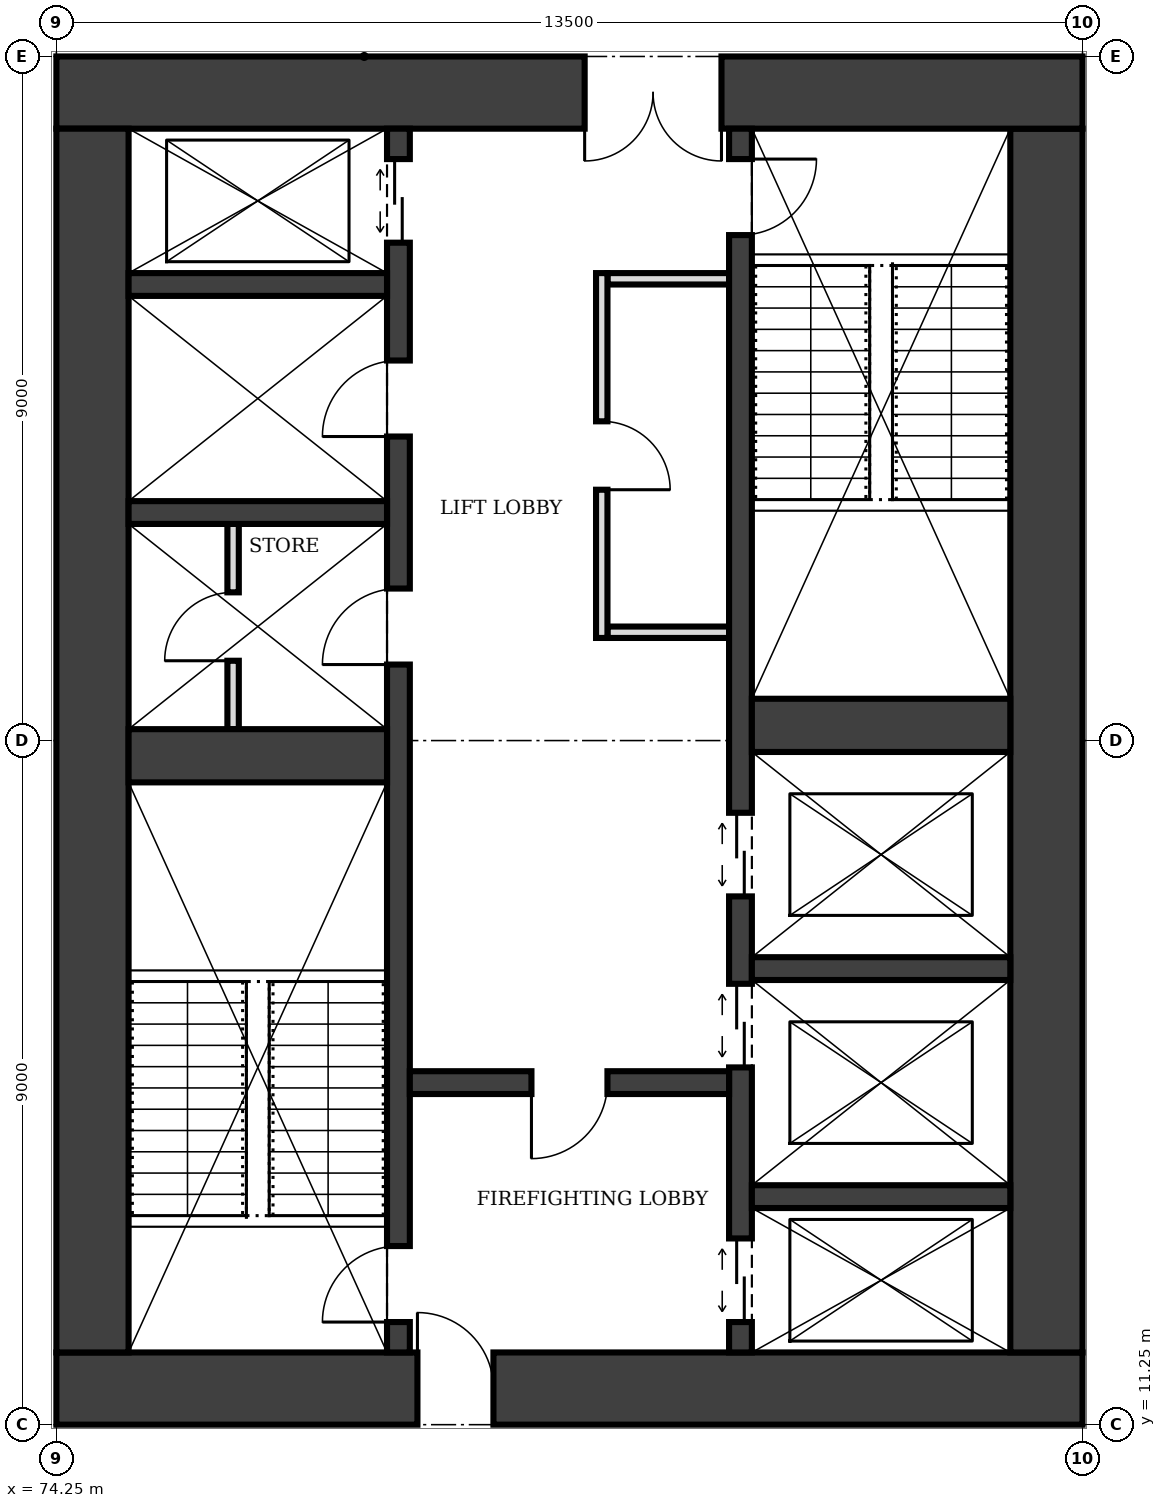
"""IFC4 building model, lengths in metres.
Left out: names, types, materials, properties, quantities, classifications, styles, units other than length and angle.
Written with IfcOpenShell. Run it as: python <this file> out.ifc"""

import sys

from ifc_helpers import new_model, si_unit, direction, frame, frame_2d, origin, place, context, subcontext, project, spatial, rectangle, extrude, element, fill, save


model = new_model("IFC4")
c1 = context("Model", 3, precision=1e-05, world=origin(), true_north=direction((0.0, 1.0)))
c2 = subcontext(c1, "Body", "Model", "MODEL_VIEW")
j1 = project(units=[si_unit("LENGTHUNIT", "METRE"), si_unit("PLANEANGLEUNIT", "RADIAN")], contexts=[c1])
p1 = place(None, origin())
s1 = spatial("IfcSite", under=j1, at=p1, CompositionType="ELEMENT")
p2 = place(p1, origin())
s2 = spatial("IfcBuilding", under=s1, at=p2, CompositionType="ELEMENT")
p3 = place(p2, frame((0.0, 0.0, 113.0)))
s3 = spatial("IfcBuildingStorey", under=s2, at=p3, CompositionType="ELEMENT", Elevation=113.0)
p4 = place(p3, frame((74.25, 11.725, 0.0), z_axis=(0.0, 0.0, 1.0), x_axis=(1.0, 0.0, 0.0)))
e1 = element("IfcWall", 1, at=p4, inside=s3, PredefinedType="SHEAR", context=c2, shape_type="SweptSolid", body=[
    extrude(rectangle(XDim=13.5, YDim=0.95, at=frame_2d((6.75, 0.0))), origin(), (0.0, 0.0, 1.0), 4.0),
])
p5 = place(p4, frame((4.75, 0.0, 0.0)))
e2 = element("IfcOpeningElement", 2, at=p5, cuts=e1, PredefinedType="OPENING", context=c2, shape_type="SweptSolid", body=[
    extrude(rectangle(XDim=1.0, YDim=2.1, at=frame_2d((0.5, 1.05))), frame((0.0, 0.485, 0.0), z_axis=(0.0, -1.0, 0.0), x_axis=(1.0, 0.0, 0.0)), (0.0, 0.0, 1.0), 0.97),
])
p6 = place(p3, frame((87.275, 12.2, 0.0), z_axis=(0.0, 0.0, 1.0), x_axis=(0.0, 1.0, 0.0)))
e3 = element("IfcWall", 3, at=p6, inside=s3, PredefinedType="SHEAR", context=c2, shape_type="SweptSolid", body=[
    extrude(rectangle(XDim=16.1, YDim=0.95, at=frame_2d((8.05, 0.0))), origin(), (0.0, 0.0, 1.0), 4.0),
])
p7 = place(p3, frame((87.75, 28.775, 0.0), z_axis=(0.0, 0.0, 1.0), x_axis=(-1.0, 0.0, 0.0)))
e4 = element("IfcWall", 4, at=p7, inside=s3, PredefinedType="SHEAR", context=c2, shape_type="SweptSolid", body=[
    extrude(rectangle(XDim=13.5, YDim=0.95, at=frame_2d((6.75, 0.0))), origin(), (0.0, 0.0, 1.0), 4.0),
])
p8 = place(p7, frame((4.75, 0.0, 0.0)))
e5 = element("IfcOpeningElement", 5, at=p8, cuts=e4, PredefinedType="OPENING", context=c2, shape_type="SweptSolid", body=[
    extrude(rectangle(XDim=1.8, YDim=2.1, at=frame_2d((0.9, 1.05))), frame((0.0, 0.485, 0.0), z_axis=(0.0, -1.0, 0.0), x_axis=(1.0, 0.0, 0.0)), (0.0, 0.0, 1.0), 0.97),
])
p9 = place(p3, frame((74.725, 28.3, 0.0), z_axis=(0.0, 0.0, 1.0), x_axis=(0.0, -1.0, 0.0)))
e6 = element("IfcWall", 6, at=p9, inside=s3, PredefinedType="SHEAR", context=c2, shape_type="SweptSolid", body=[
    extrude(rectangle(XDim=16.1, YDim=0.95, at=frame_2d((8.05, 0.0))), origin(), (0.0, 0.0, 1.0), 4.0),
])
p10 = place(p3, frame((78.75, 12.2, 0.0), z_axis=(0.0, 0.0, 1.0), x_axis=(0.0, 1.0, 0.0)))
e7 = element("IfcWall", 7, at=p10, inside=s3, PredefinedType="SHEAR", context=c2, shape_type="SweptSolid", body=[
    extrude(rectangle(XDim=16.1, YDim=0.3, at=frame_2d((8.05, 0.0))), origin(), (0.0, 0.0, 1.0), 4.0),
])
p11 = place(p10, frame((0.4, 0.0, 0.0)))
e8 = element("IfcOpeningElement", 8, at=p11, cuts=e7, PredefinedType="OPENING", context=c2, shape_type="SweptSolid", body=[
    extrude(rectangle(XDim=1.0, YDim=2.1, at=frame_2d((0.5, 1.05))), frame((0.0, 0.16, 0.0), z_axis=(0.0, -1.0, 0.0), x_axis=(1.0, 0.0, 0.0)), (0.0, 0.0, 1.0), 0.32),
])
p12 = place(p10, frame((14.6, 0.0, 0.0)))
e9 = element("IfcOpeningElement", 9, at=p12, cuts=e7, PredefinedType="OPENING", context=c2, shape_type="SweptSolid", body=[
    extrude(rectangle(XDim=1.1, YDim=2.1, at=frame_2d((0.55, 1.05))), frame((0.0, 0.16, 0.0), z_axis=(0.0, -1.0, 0.0), x_axis=(1.0, 0.0, 0.0)), (0.0, 0.0, 1.0), 0.32),
])
p13 = place(p10, frame((9.05, 0.0, 0.0)))
e10 = element("IfcOpeningElement", 10, at=p13, cuts=e7, PredefinedType="OPENING", context=c2, shape_type="SweptSolid", body=[
    extrude(rectangle(XDim=1.0, YDim=2.1, at=frame_2d((0.5, 1.05))), frame((0.0, 0.16, 0.0), z_axis=(0.0, -1.0, 0.0), x_axis=(1.0, 0.0, 0.0)), (0.0, 0.0, 1.0), 0.32),
])
p14 = place(p10, frame((12.05, 0.0, 0.0)))
e11 = element("IfcOpeningElement", 11, at=p14, cuts=e7, PredefinedType="OPENING", context=c2, shape_type="SweptSolid", body=[
    extrude(rectangle(XDim=1.0, YDim=2.1, at=frame_2d((0.5, 1.05))), frame((0.0, 0.16, 0.0), z_axis=(0.0, -1.0, 0.0), x_axis=(1.0, 0.0, 0.0)), (0.0, 0.0, 1.0), 0.32),
])
p15 = place(p3, frame((83.25, 12.2, 0.0), z_axis=(0.0, 0.0, 1.0), x_axis=(0.0, 1.0, 0.0)))
e12 = element("IfcWall", 12, at=p15, inside=s3, PredefinedType="SHEAR", context=c2, shape_type="SweptSolid", body=[
    extrude(rectangle(XDim=16.1, YDim=0.3, at=frame_2d((8.05, 0.0))), origin(), (0.0, 0.0, 1.0), 4.0),
])
p16 = place(p15, frame((14.7, 0.0, 0.0)))
e13 = element("IfcOpeningElement", 13, at=p16, cuts=e12, PredefinedType="OPENING", context=c2, shape_type="SweptSolid", body=[
    extrude(rectangle(XDim=1.0, YDim=2.1, at=frame_2d((0.5, 1.05))), frame((0.0, 0.16, 0.0), z_axis=(0.0, -1.0, 0.0), x_axis=(1.0, 0.0, 0.0)), (0.0, 0.0, 1.0), 0.32),
])
p17 = place(p15, frame((0.4, 0.0, 0.0)))
e14 = element("IfcOpeningElement", 14, at=p17, cuts=e12, PredefinedType="OPENING", context=c2, shape_type="SweptSolid", body=[
    extrude(rectangle(XDim=1.1, YDim=2.1, at=frame_2d((0.55, 1.05))), frame((0.0, 0.16, 0.0), z_axis=(0.0, -1.0, 0.0), x_axis=(1.0, 0.0, 0.0)), (0.0, 0.0, 1.0), 0.32),
])
p18 = place(p15, frame((3.75, 0.0, 0.0)))
e15 = element("IfcOpeningElement", 15, at=p18, cuts=e12, PredefinedType="OPENING", context=c2, shape_type="SweptSolid", body=[
    extrude(rectangle(XDim=1.1, YDim=2.1, at=frame_2d((0.55, 1.05))), frame((0.0, 0.16, 0.0), z_axis=(0.0, -1.0, 0.0), x_axis=(1.0, 0.0, 0.0)), (0.0, 0.0, 1.0), 0.32),
])
p19 = place(p15, frame((6.0, 0.0, 0.0)))
e16 = element("IfcOpeningElement", 16, at=p19, cuts=e12, PredefinedType="OPENING", context=c2, shape_type="SweptSolid", body=[
    extrude(rectangle(XDim=1.1, YDim=2.1, at=frame_2d((0.55, 1.05))), frame((0.0, 0.16, 0.0), z_axis=(0.0, -1.0, 0.0), x_axis=(1.0, 0.0, 0.0)), (0.0, 0.0, 1.0), 0.32),
])
p20 = place(p3, frame((75.2, 20.05, 0.0), z_axis=(0.0, 0.0, 1.0), x_axis=(1.0, 0.0, 0.0)))
e17 = element("IfcWall", 17, at=p20, inside=s3, PredefinedType="SHEAR", context=c2, shape_type="SweptSolid", body=[
    extrude(rectangle(XDim=3.4, YDim=0.7, at=frame_2d((1.7, 0.0))), origin(), (0.0, 0.0, 1.0), 4.0),
])
p21 = place(p3, frame((78.9, 15.75, 0.0), z_axis=(0.0, 0.0, 1.0), x_axis=(1.0, 0.0, 0.0)))
e18 = element("IfcWall", 18, at=p21, inside=s3, PredefinedType="SHEAR", context=c2, shape_type="SweptSolid", body=[
    extrude(rectangle(XDim=4.2, YDim=0.3, at=frame_2d((2.1, 0.0))), origin(), (0.0, 0.0, 1.0), 4.0),
])
p22 = place(p21, frame((1.6, 0.0, 0.0)))
e19 = element("IfcOpeningElement", 19, at=p22, cuts=e18, PredefinedType="OPENING", context=c2, shape_type="SweptSolid", body=[
    extrude(rectangle(XDim=1.0, YDim=2.1, at=frame_2d((0.5, 1.05))), frame((0.0, 0.16, 0.0), z_axis=(0.0, -1.0, 0.0), x_axis=(1.0, 0.0, 0.0)), (0.0, 0.0, 1.0), 0.32),
])
for number, where, z_axis, x_axis in (
    (20, (83.4, 14.25, 0.0), (0.0, 0.0, 1.0), (1.0, 0.0, 0.0)),
    (21, (83.4, 17.25, 0.0), (0.0, 0.0, 1.0), (1.0, 0.0, 0.0)),
):
    element("IfcWall", number, at=place(p3, frame(where, z_axis=z_axis, x_axis=x_axis)), inside=s3, PredefinedType="SHEAR", context=c2, shape_type="SweptSolid", body=[
        extrude(rectangle(XDim=3.4, YDim=0.3, at=frame_2d((1.7, 0.0))), origin(), (0.0, 0.0, 1.0), 4.0),
    ])
p23 = place(p3, frame((83.4, 20.45, 0.0), z_axis=(0.0, 0.0, 1.0), x_axis=(1.0, 0.0, 0.0)))
e22 = element("IfcWall", 22, at=p23, inside=s3, PredefinedType="SHEAR", context=c2, shape_type="SweptSolid", body=[
    extrude(rectangle(XDim=3.4, YDim=0.7, at=frame_2d((1.7, 0.0))), origin(), (0.0, 0.0, 1.0), 4.0),
])
for number, where, z_axis, x_axis in (
    (23, (75.2, 23.25, 0.0), (0.0, 0.0, 1.0), (1.0, 0.0, 0.0)),
    (24, (75.2, 26.25, 0.0), (0.0, 0.0, 1.0), (1.0, 0.0, 0.0)),
):
    element("IfcWall", number, at=place(p3, frame(where, z_axis=z_axis, x_axis=x_axis)), inside=s3, PredefinedType="SHEAR", context=c2, shape_type="SweptSolid", body=[
        extrude(rectangle(XDim=3.4, YDim=0.3, at=frame_2d((1.7, 0.0))), origin(), (0.0, 0.0, 1.0), 4.0),
    ])
p24 = place(p3, frame((81.425, 21.6, 0.0), z_axis=(0.0, 0.0, 1.0), x_axis=(0.0, 1.0, 0.0)))
e25 = element("IfcWall", 25, at=p24, inside=s3, PredefinedType="PARTITIONING", context=c2, shape_type="SweptSolid", body=[
    extrude(rectangle(XDim=4.8, YDim=0.15, at=frame_2d((2.4, 0.0))), origin(), (0.0, 0.0, 1.0), 3.75),
])
p25 = place(p24, frame((1.95, 0.0, 0.0)))
e26 = element("IfcOpeningElement", 26, at=p25, cuts=e25, PredefinedType="OPENING", context=c2, shape_type="SweptSolid", body=[
    extrude(rectangle(XDim=0.9, YDim=2.1, at=frame_2d((0.45, 1.05))), frame((0.0, 0.085, 0.0), z_axis=(0.0, -1.0, 0.0), x_axis=(1.0, 0.0, 0.0)), (0.0, 0.0, 1.0), 0.17),
])
for number, where, z_axis, x_axis in (
    (27, (81.5, 21.675, 0.0), (0.0, 0.0, 1.0), (1.0, 0.0, 0.0)),
    (28, (81.5, 26.325, 0.0), (0.0, 0.0, 1.0), (1.0, 0.0, 0.0)),
):
    element("IfcWall", number, at=place(p3, frame(where, z_axis=z_axis, x_axis=x_axis)), inside=s3, PredefinedType="PARTITIONING", context=c2, shape_type="SweptSolid", body=[
        extrude(rectangle(XDim=1.6, YDim=0.15, at=frame_2d((0.8, 0.0))), origin(), (0.0, 0.0, 1.0), 3.75),
    ])
p26 = place(p3, frame((76.575, 20.4, 0.0), z_axis=(0.0, 0.0, 1.0), x_axis=(0.0, 1.0, 0.0)))
e29 = element("IfcWall", 29, at=p26, inside=s3, PredefinedType="PARTITIONING", context=c2, shape_type="SweptSolid", body=[
    extrude(rectangle(XDim=2.7, YDim=0.15, at=frame_2d((1.35, 0.0))), origin(), (0.0, 0.0, 1.0), 3.75),
])
p27 = place(p26, frame((0.9, 0.0, 0.0)))
e30 = element("IfcOpeningElement", 30, at=p27, cuts=e29, PredefinedType="OPENING", context=c2, shape_type="SweptSolid", body=[
    extrude(rectangle(XDim=0.9, YDim=2.1, at=frame_2d((0.45, 1.05))), frame((0.0, 0.085, 0.0), z_axis=(0.0, -1.0, 0.0), x_axis=(1.0, 0.0, 0.0)), (0.0, 0.0, 1.0), 0.17),
])
p28 = place(p5, origin())
e31 = element("IfcDoor", 31, at=p28, inside=s3, OperationType="SINGLE_SWING_LEFT", PredefinedType="DOOR", context=c2, shape_type="SweptSolid", body=[
    extrude(rectangle(XDim=1.0, YDim=2.1, at=frame_2d((0.5, 1.05))), frame((0.0, 0.025, 0.0), z_axis=(0.0, -1.0, 0.0), x_axis=(1.0, 0.0, 0.0)), (0.0, 0.0, 1.0), 0.05),
])
fill(e2, e31)
p29 = place(p8, origin())
e32 = element("IfcDoor", 32, at=p29, inside=s3, OperationType="DOUBLE_DOOR_SINGLE_SWING", PredefinedType="DOOR", context=c2, shape_type="SweptSolid", body=[
    extrude(rectangle(XDim=1.8, YDim=2.1, at=frame_2d((0.9, 1.05))), frame((0.0, 0.025, 0.0), z_axis=(0.0, -1.0, 0.0), x_axis=(1.0, 0.0, 0.0)), (0.0, 0.0, 1.0), 0.05),
])
fill(e5, e32)
p30 = place(p22, frame((1.0, 0.0, 0.0), z_axis=(0.0, 0.0, 1.0), x_axis=(-1.0, 0.0, 0.0)))
e33 = element("IfcDoor", 33, at=p30, inside=s3, OperationType="SINGLE_SWING_RIGHT", PredefinedType="DOOR", context=c2, shape_type="SweptSolid", body=[
    extrude(rectangle(XDim=1.0, YDim=2.1, at=frame_2d((0.5, 1.05))), frame((0.0, 0.025, 0.0), z_axis=(0.0, -1.0, 0.0), x_axis=(1.0, 0.0, 0.0)), (0.0, 0.0, 1.0), 0.05),
])
fill(e19, e33)
p31 = place(p11, origin())
e34 = element("IfcDoor", 34, at=p31, inside=s3, OperationType="SINGLE_SWING_LEFT", PredefinedType="DOOR", context=c2, shape_type="SweptSolid", body=[
    extrude(rectangle(XDim=1.0, YDim=2.1, at=frame_2d((0.5, 1.05))), frame((0.0, 0.025, 0.0), z_axis=(0.0, -1.0, 0.0), x_axis=(1.0, 0.0, 0.0)), (0.0, 0.0, 1.0), 0.05),
])
fill(e8, e34)
p32 = place(p16, frame((1.0, 0.0, 0.0), z_axis=(0.0, 0.0, 1.0), x_axis=(-1.0, 0.0, 0.0)))
e35 = element("IfcDoor", 35, at=p32, inside=s3, OperationType="SINGLE_SWING_LEFT", PredefinedType="DOOR", context=c2, shape_type="SweptSolid", body=[
    extrude(rectangle(XDim=1.0, YDim=2.1, at=frame_2d((0.5, 1.05))), frame((0.0, 0.025, 0.0), z_axis=(0.0, -1.0, 0.0), x_axis=(1.0, 0.0, 0.0)), (0.0, 0.0, 1.0), 0.05),
])
fill(e13, e35)
p33 = place(p17, origin())
e36 = element("IfcDoor", 36, at=p33, inside=s3, OperationType="DOUBLE_DOOR_SLIDING", PredefinedType="DOOR", context=c2, shape_type="SweptSolid", body=[
    extrude(rectangle(XDim=1.1, YDim=2.1, at=frame_2d((0.55, 1.05))), frame((0.0, 0.025, 0.0), z_axis=(0.0, -1.0, 0.0), x_axis=(1.0, 0.0, 0.0)), (0.0, 0.0, 1.0), 0.05),
])
fill(e14, e36)
p34 = place(p12, origin())
e37 = element("IfcDoor", 37, at=p34, inside=s3, OperationType="DOUBLE_DOOR_SLIDING", PredefinedType="DOOR", context=c2, shape_type="SweptSolid", body=[
    extrude(rectangle(XDim=1.1, YDim=2.1, at=frame_2d((0.55, 1.05))), frame((0.0, 0.025, 0.0), z_axis=(0.0, -1.0, 0.0), x_axis=(1.0, 0.0, 0.0)), (0.0, 0.0, 1.0), 0.05),
])
fill(e9, e37)
p35 = place(p18, origin())
e38 = element("IfcDoor", 38, at=p35, inside=s3, OperationType="DOUBLE_DOOR_SLIDING", PredefinedType="DOOR", context=c2, shape_type="SweptSolid", body=[
    extrude(rectangle(XDim=1.1, YDim=2.1, at=frame_2d((0.55, 1.05))), frame((0.0, 0.025, 0.0), z_axis=(0.0, -1.0, 0.0), x_axis=(1.0, 0.0, 0.0)), (0.0, 0.0, 1.0), 0.05),
])
fill(e15, e38)
p36 = place(p19, origin())
e39 = element("IfcDoor", 39, at=p36, inside=s3, OperationType="DOUBLE_DOOR_SLIDING", PredefinedType="DOOR", context=c2, shape_type="SweptSolid", body=[
    extrude(rectangle(XDim=1.1, YDim=2.1, at=frame_2d((0.55, 1.05))), frame((0.0, 0.025, 0.0), z_axis=(0.0, -1.0, 0.0), x_axis=(1.0, 0.0, 0.0)), (0.0, 0.0, 1.0), 0.05),
])
fill(e16, e39)
p37 = place(p25, frame((0.9, 0.0, 0.0), z_axis=(0.0, 0.0, 1.0), x_axis=(-1.0, 0.0, 0.0)))
e40 = element("IfcDoor", 40, at=p37, inside=s3, OperationType="SINGLE_SWING_RIGHT", PredefinedType="DOOR", context=c2, shape_type="SweptSolid", body=[
    extrude(rectangle(XDim=0.9, YDim=2.1, at=frame_2d((0.45, 1.05))), frame((0.0, 0.025, 0.0), z_axis=(0.0, -1.0, 0.0), x_axis=(1.0, 0.0, 0.0)), (0.0, 0.0, 1.0), 0.05),
])
fill(e26, e40)
p38 = place(p13, origin())
e41 = element("IfcDoor", 41, at=p38, inside=s3, OperationType="SINGLE_SWING_LEFT", PredefinedType="DOOR", context=c2, shape_type="SweptSolid", body=[
    extrude(rectangle(XDim=1.0, YDim=2.1, at=frame_2d((0.5, 1.05))), frame((0.0, 0.025, 0.0), z_axis=(0.0, -1.0, 0.0), x_axis=(1.0, 0.0, 0.0)), (0.0, 0.0, 1.0), 0.05),
])
fill(e10, e41)
p39 = place(p27, origin())
e42 = element("IfcDoor", 42, at=p39, inside=s3, OperationType="SINGLE_SWING_LEFT", PredefinedType="DOOR", context=c2, shape_type="SweptSolid", body=[
    extrude(rectangle(XDim=0.9, YDim=2.1, at=frame_2d((0.45, 1.05))), frame((0.0, 0.025, 0.0), z_axis=(0.0, -1.0, 0.0), x_axis=(1.0, 0.0, 0.0)), (0.0, 0.0, 1.0), 0.05),
])
fill(e30, e42)
p40 = place(p14, origin())
e43 = element("IfcDoor", 43, at=p40, inside=s3, OperationType="SINGLE_SWING_LEFT", PredefinedType="DOOR", context=c2, shape_type="SweptSolid", body=[
    extrude(rectangle(XDim=1.0, YDim=2.1, at=frame_2d((0.5, 1.05))), frame((0.0, 0.025, 0.0), z_axis=(0.0, -1.0, 0.0), x_axis=(1.0, 0.0, 0.0)), (0.0, 0.0, 1.0), 0.05),
])
fill(e11, e43)
save(model, sys.argv[1])
